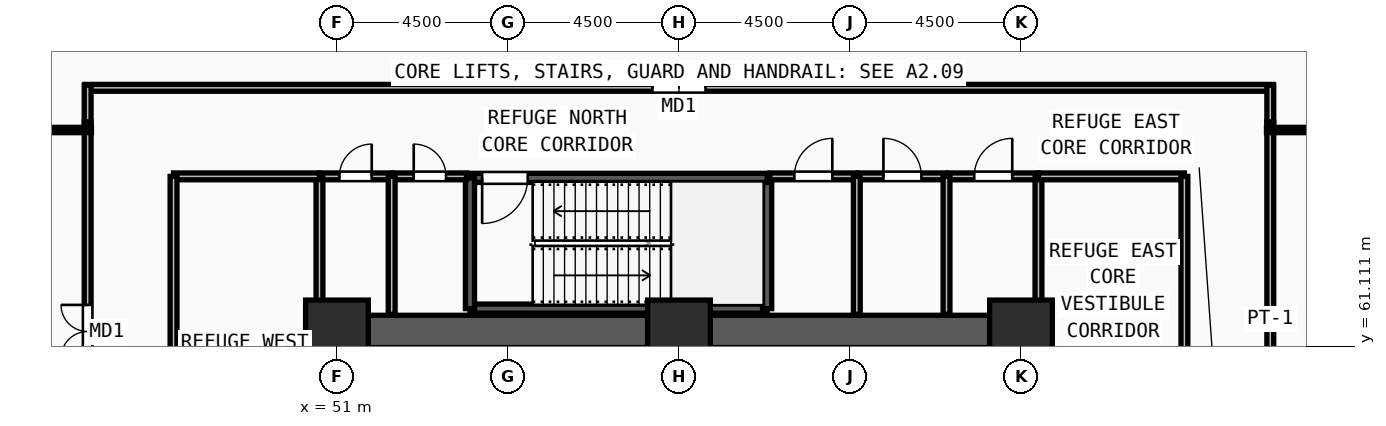
"""IFC4 building model, lengths in metres.
Left out: names, types, materials, properties, quantities, classifications, styles, units other than length and angle.
Written with IfcOpenShell. Run it as: python <this file> out.ifc"""

import sys

from ifc_helpers import new_model, si_unit, direction, frame, frame_2d, origin, origin_2d, place, context, subcontext, project, spatial, rectangle, extrude, source, transform, mapped, element, fill, save


model = new_model("IFC4")
c1 = context("Model", 3, precision=1e-05, world=origin(), true_north=direction((0.0, 1.0)))
c2 = subcontext(c1, "Body", "Model", "MODEL_VIEW")
j1 = project(units=[si_unit("LENGTHUNIT", "METRE"), si_unit("PLANEANGLEUNIT", "RADIAN")], contexts=[c1])
p1 = place(None, origin())
s1 = spatial("IfcSite", under=j1, at=p1, CompositionType="ELEMENT")
p2 = place(p1, origin())
s2 = spatial("IfcBuilding", under=s1, at=p2, CompositionType="ELEMENT")
p3 = place(p2, frame((0.0, 0.0, 47.25)))
s3 = spatial("IfcBuildingStorey", under=s2, at=p3, CompositionType="ELEMENT", Elevation=47.25)
m1 = source(origin(), c2, "Body", "SweptSolid", [
    extrude(rectangle(XDim=1.65, YDim=1.65, at=origin_2d()), origin(), (0.0, 0.0, 1.0), 4.5),
])
for number, where, z_axis, x_axis in (
    (1, (69.0, 61.5, 0.0), (0.0, 0.0, 1.0), (1.0, 0.0, 0.0)),
    (2, (60.0, 61.5, 0.0), (0.0, 0.0, 1.0), (1.0, 0.0, 0.0)),
    (3, (51.0, 61.5, 0.0), (0.0, 0.0, 1.0), (1.0, 0.0, 0.0)),
):
    element("IfcColumn", number, at=place(p3, frame(where, z_axis=z_axis, x_axis=x_axis)), inside=s3, PredefinedType="COLUMN", context=c2, shape_type="MappedRepresentation", body=[
        mapped(m1, transform((0.0, 0.0, 0.0), x_axis=(1.0, 0.0, 0.0), y_axis=(0.0, 1.0, 0.0), z_axis=(0.0, 0.0, 1.0), scale=1.0)),
    ])
for number, where, z_axis, x_axis in (
    (4, (51.825, 61.5, 0.0), (0.0, 0.0, 1.0), (1.0, 0.0, 0.0)),
    (5, (60.825, 61.5, 0.0), (0.0, 0.0, 1.0), (1.0, 0.0, 0.0)),
):
    element("IfcWall", number, at=place(p3, frame(where, z_axis=z_axis, x_axis=x_axis)), inside=s3, PredefinedType="SHEAR", context=c2, shape_type="SweptSolid", body=[
        extrude(rectangle(XDim=7.35, YDim=0.85, at=frame_2d((3.675, 0.0))), origin(), (0.0, 0.0, 1.0), 4.32),
    ])
p4 = place(p3, frame((54.5, 62.1, 0.0), z_axis=(0.0, 0.0, 1.0), x_axis=(1.0, 0.0, 0.0)))
e6 = element("IfcWall", 6, at=p4, inside=s3, PredefinedType="SOLIDWALL", context=c2, shape_type="SweptSolid", body=[
    extrude(rectangle(XDim=7.82, YDim=0.24, at=frame_2d((3.91, 0.0))), origin(), (0.0, 0.0, 1.0), 4.32),
])
p5 = place(p3, frame((62.32, 62.1, 0.0), z_axis=(0.0, 0.0, 1.0), x_axis=(0.0, 1.0, 0.0)))
e7 = element("IfcWall", 7, at=p5, inside=s3, PredefinedType="SOLIDWALL", context=c2, shape_type="SweptSolid", body=[
    extrude(rectangle(XDim=3.44, YDim=0.24, at=frame_2d((1.72, 0.0))), origin(), (0.0, 0.0, 1.0), 4.32),
])
p6 = place(p3, frame((62.32, 65.54, 0.0), z_axis=(0.0, 0.0, 1.0), x_axis=(-1.0, 0.0, 0.0)))
e8 = element("IfcWall", 8, at=p6, inside=s3, PredefinedType="SOLIDWALL", context=c2, shape_type="SweptSolid", body=[
    extrude(rectangle(XDim=7.82, YDim=0.24, at=frame_2d((3.91, 0.0))), origin(), (0.0, 0.0, 1.0), 4.32),
])
m2 = source(origin(), c2, "Body", "SweptSolid", [
    extrude(rectangle(XDim=1.2, YDim=2.2, at=frame_2d((0.6, 1.1))), frame((0.0, 0.13, 0.0), z_axis=(0.0, -1.0, 0.0), x_axis=(1.0, 0.0, 0.0)), (0.0, 0.0, 1.0), 0.26),
])
p7 = place(p6, frame((6.3, 0.0, 0.0)))
e9 = element("IfcOpeningElement", 9, at=p7, cuts=e8, PredefinedType="OPENING", context=c2, shape_type="MappedRepresentation", body=[
    mapped(m2, transform((0.0, 0.0, 0.0), x_axis=(1.0, 0.0, 0.0), y_axis=(0.0, 1.0, 0.0), z_axis=(0.0, 0.0, 1.0), scale=1.0)),
])
p8 = place(p3, frame((54.5, 65.54, 0.0), z_axis=(0.0, 0.0, 1.0), x_axis=(0.0, -1.0, 0.0)))
e10 = element("IfcWall", 10, at=p8, inside=s3, PredefinedType="SOLIDWALL", context=c2, shape_type="SweptSolid", body=[
    extrude(rectangle(XDim=3.44, YDim=0.24, at=frame_2d((1.72, 0.0))), origin(), (0.0, 0.0, 1.0), 4.32),
])
p9 = place(p3, frame((50.54, 65.58, 0.0), z_axis=(0.0, 0.0, 1.0), x_axis=(1.0, 0.0, 0.0)))
e11 = element("IfcWall", 11, at=p9, inside=s3, PredefinedType="PARTITIONING", context=c2, shape_type="SweptSolid", body=[
    extrude(rectangle(XDim=1.9, YDim=0.18, at=frame_2d((0.95, 0.0))), origin(), (0.0, 0.0, 1.0), 4.32),
])
m3 = source(origin(), c2, "Body", "SweptSolid", [
    extrude(rectangle(XDim=0.85, YDim=2.1, at=frame_2d((0.425, 1.05))), frame((0.0, 0.1, 0.0), z_axis=(0.0, -1.0, 0.0), x_axis=(1.0, 0.0, 0.0)), (0.0, 0.0, 1.0), 0.2),
])
p10 = place(p9, frame((0.525, 0.0, 0.0)))
e12 = element("IfcOpeningElement", 12, at=p10, cuts=e11, PredefinedType="OPENING", context=c2, shape_type="MappedRepresentation", body=[
    mapped(m3, transform((0.0, 0.0, 0.0), x_axis=(1.0, 0.0, 0.0), y_axis=(0.0, 1.0, 0.0), z_axis=(0.0, 0.0, 1.0), scale=1.0)),
])
p11 = place(p3, frame((52.48, 65.58, 0.0), z_axis=(0.0, 0.0, 1.0), x_axis=(1.0, 0.0, 0.0)))
e13 = element("IfcWall", 13, at=p11, inside=s3, PredefinedType="PARTITIONING", context=c2, shape_type="SweptSolid", body=[
    extrude(rectangle(XDim=1.93, YDim=0.18, at=frame_2d((0.965, 0.0))), origin(), (0.0, 0.0, 1.0), 4.32),
])
p12 = place(p11, frame((0.54, 0.0, 0.0)))
e14 = element("IfcOpeningElement", 14, at=p12, cuts=e13, PredefinedType="OPENING", context=c2, shape_type="MappedRepresentation", body=[
    mapped(m3, transform((0.0, 0.0, 0.0), x_axis=(1.0, 0.0, 0.0), y_axis=(0.0, 1.0, 0.0), z_axis=(0.0, 0.0, 1.0), scale=1.0)),
])
p13 = place(p3, frame((62.39, 65.58, 0.0), z_axis=(0.0, 0.0, 1.0), x_axis=(1.0, 0.0, 0.0)))
e15 = element("IfcWall", 15, at=p13, inside=s3, PredefinedType="PARTITIONING", context=c2, shape_type="SweptSolid", body=[
    extrude(rectangle(XDim=2.29, YDim=0.18, at=frame_2d((1.145, 0.0))), origin(), (0.0, 0.0, 1.0), 4.32),
])
m4 = source(origin(), c2, "Body", "SweptSolid", [
    extrude(rectangle(XDim=1.0, YDim=2.2, at=frame_2d((0.5, 1.1))), frame((0.0, 0.1, 0.0), z_axis=(0.0, -1.0, 0.0), x_axis=(1.0, 0.0, 0.0)), (0.0, 0.0, 1.0), 0.2),
])
p14 = place(p13, frame((0.645, 0.0, 0.0)))
e16 = element("IfcOpeningElement", 16, at=p14, cuts=e15, PredefinedType="OPENING", context=c2, shape_type="MappedRepresentation", body=[
    mapped(m4, transform((0.0, 0.0, 0.0), x_axis=(1.0, 0.0, 0.0), y_axis=(0.0, 1.0, 0.0), z_axis=(0.0, 0.0, 1.0), scale=1.0)),
])
p15 = place(p3, frame((64.72, 65.58, 0.0), z_axis=(0.0, 0.0, 1.0), x_axis=(1.0, 0.0, 0.0)))
e17 = element("IfcWall", 17, at=p15, inside=s3, PredefinedType="PARTITIONING", context=c2, shape_type="SweptSolid", body=[
    extrude(rectangle(XDim=2.32, YDim=0.18, at=frame_2d((1.16, 0.0))), origin(), (0.0, 0.0, 1.0), 4.32),
])
p16 = place(p15, frame((0.66, 0.0, 0.0)))
e18 = element("IfcOpeningElement", 18, at=p16, cuts=e17, PredefinedType="OPENING", context=c2, shape_type="MappedRepresentation", body=[
    mapped(m4, transform((0.0, 0.0, 0.0), x_axis=(1.0, 0.0, 0.0), y_axis=(0.0, 1.0, 0.0), z_axis=(0.0, 0.0, 1.0), scale=1.0)),
])
p17 = place(p3, frame((67.08, 65.58, 0.0), z_axis=(0.0, 0.0, 1.0), x_axis=(1.0, 0.0, 0.0)))
e19 = element("IfcWall", 19, at=p17, inside=s3, PredefinedType="PARTITIONING", context=c2, shape_type="SweptSolid", body=[
    extrude(rectangle(XDim=2.38, YDim=0.18, at=frame_2d((1.19, 0.0))), origin(), (0.0, 0.0, 1.0), 4.32),
])
p18 = place(p17, frame((0.69, 0.0, 0.0)))
e20 = element("IfcOpeningElement", 20, at=p18, cuts=e19, PredefinedType="OPENING", context=c2, shape_type="MappedRepresentation", body=[
    mapped(m4, transform((0.0, 0.0, 0.0), x_axis=(1.0, 0.0, 0.0), y_axis=(0.0, 1.0, 0.0), z_axis=(0.0, 0.0, 1.0), scale=1.0)),
])
p19 = place(p3, frame((75.56, 67.015, 0.0), z_axis=(0.0, 0.0, 1.0), x_axis=(0.0, -1.0, 0.0)))
e21 = element("IfcWall", 21, at=p19, inside=s3, PredefinedType="PARTITIONING", context=c2, shape_type="SweptSolid", body=[
    extrude(rectangle(XDim=22.43, YDim=0.18, at=frame_2d((11.215, 0.0))), origin(), (0.0, 0.0, 1.0), 4.32),
])
m5 = source(origin(), c2, "Body", "SweptSolid", [
    extrude(rectangle(XDim=1.3, YDim=2.2, at=frame_2d((0.65, 1.1))), frame((0.0, 0.1, 0.0), z_axis=(0.0, -1.0, 0.0), x_axis=(1.0, 0.0, 0.0)), (0.0, 0.0, 1.0), 0.2),
])
p20 = place(p19, frame((10.565, 0.0, 0.0)))
e22 = element("IfcOpeningElement", 22, at=p20, cuts=e21, PredefinedType="OPENING", context=c2, shape_type="MappedRepresentation", body=[
    mapped(m5, transform((0.0, 0.0, 0.0), x_axis=(1.0, 0.0, 0.0), y_axis=(0.0, 1.0, 0.0), z_axis=(0.0, 0.0, 1.0), scale=1.0)),
])
p21 = place(p3, frame((44.37, 67.91, 0.0), z_axis=(0.0, 0.0, 1.0), x_axis=(1.0, 0.0, 0.0)))
e23 = element("IfcWall", 23, at=p21, inside=s3, PredefinedType="PARTITIONING", context=c2, shape_type="SweptSolid", body=[
    extrude(rectangle(XDim=31.26, YDim=0.18, at=frame_2d((15.63, 0.0))), origin(), (0.0, 0.0, 1.0), 4.32),
])
m6 = source(origin(), c2, "Body", "SweptSolid", [
    extrude(rectangle(XDim=1.4, YDim=2.25, at=frame_2d((0.7, 1.125))), frame((0.0, 0.1, 0.0), z_axis=(0.0, -1.0, 0.0), x_axis=(1.0, 0.0, 0.0)), (0.0, 0.0, 1.0), 0.2),
])
p22 = place(p21, frame((14.93, 0.0, 0.0)))
e24 = element("IfcOpeningElement", 24, at=p22, cuts=e23, PredefinedType="OPENING", context=c2, shape_type="MappedRepresentation", body=[
    mapped(m6, transform((0.0, 0.0, 0.0), x_axis=(1.0, 0.0, 0.0), y_axis=(0.0, 1.0, 0.0), z_axis=(0.0, 0.0, 1.0), scale=1.0)),
])
p23 = place(p3, frame((44.44, 55.98, 0.0), z_axis=(0.0, 0.0, 1.0), x_axis=(0.0, 1.0, 0.0)))
e25 = element("IfcWall", 25, at=p23, inside=s3, PredefinedType="PARTITIONING", context=c2, shape_type="SweptSolid", body=[
    extrude(rectangle(XDim=11.035, YDim=0.18, at=frame_2d((5.518, 0.0))), origin(), (0.0, 0.0, 1.0), 4.32),
])
p24 = place(p23, frame((4.818, 0.0, 0.0)))
e26 = element("IfcOpeningElement", 26, at=p24, cuts=e25, PredefinedType="OPENING", context=c2, shape_type="MappedRepresentation", body=[
    mapped(m6, transform((0.0, 0.0, 0.0), x_axis=(1.0, 0.0, 0.0), y_axis=(0.0, 1.0, 0.0), z_axis=(0.0, 0.0, 1.0), scale=1.0)),
])
for number, where, z_axis, x_axis in (
    (27, (50.54, 61.95, 0.0), (0.0, 0.0, 1.0), (0.0, 1.0, 0.0)),
    (28, (52.44, 61.95, 0.0), (0.0, 0.0, 1.0), (0.0, 1.0, 0.0)),
    (29, (64.68, 61.95, 0.0), (0.0, 0.0, 1.0), (0.0, 1.0, 0.0)),
    (30, (67.04, 61.95, 0.0), (0.0, 0.0, 1.0), (0.0, 1.0, 0.0)),
    (31, (69.46, 61.95, 0.0), (0.0, 0.0, 1.0), (0.0, 1.0, 0.0)),
):
    element("IfcWall", number, at=place(p3, frame(where, z_axis=z_axis, x_axis=x_axis)), inside=s3, PredefinedType="PARTITIONING", context=c2, shape_type="SweptSolid", body=[
        extrude(rectangle(XDim=3.63, YDim=0.18, at=frame_2d((1.815, 0.0))), origin(), (0.0, 0.0, 1.0), 4.32),
    ])
for number, where, z_axis, x_axis in (
    (32, (46.7, 65.58, 0.0), (0.0, 0.0, 1.0), (1.0, 0.0, 0.0)),
    (33, (69.46, 65.58, 0.0), (0.0, 0.0, 1.0), (1.0, 0.0, 0.0)),
):
    element("IfcWall", number, at=place(p3, frame(where, z_axis=z_axis, x_axis=x_axis)), inside=s3, PredefinedType="PARTITIONING", context=c2, shape_type="SweptSolid", body=[
        extrude(rectangle(XDim=3.84, YDim=0.18, at=frame_2d((1.92, 0.0))), origin(), (0.0, 0.0, 1.0), 4.32),
    ])
for number, where, z_axis, x_axis in (
    (34, (46.7, 60.06, 0.0), (0.0, 0.0, 1.0), (0.0, 1.0, 0.0)),
    (35, (73.3, 60.06, 0.0), (0.0, 0.0, 1.0), (0.0, 1.0, 0.0)),
):
    element("IfcWall", number, at=place(p3, frame(where, z_axis=z_axis, x_axis=x_axis)), inside=s3, PredefinedType="PARTITIONING", context=c2, shape_type="SweptSolid", body=[
        extrude(rectangle(XDim=5.52, YDim=0.18, at=frame_2d((2.76, 0.0))), origin(), (0.0, 0.0, 1.0), 4.32),
    ])
for number, where, z_axis, x_axis in (
    (36, (44.44, 67.015, 0.0), (0.0, 0.0, 1.0), (0.0, 1.0, 0.0)),
    (37, (75.56, 67.98, 0.0), (0.0, 0.0, 1.0), (0.0, -1.0, 0.0)),
):
    element("IfcWall", number, at=place(p3, frame(where, z_axis=z_axis, x_axis=x_axis)), inside=s3, PredefinedType="PARTITIONING", context=c2, shape_type="SweptSolid", body=[
        extrude(rectangle(XDim=0.965, YDim=0.18, at=frame_2d((0.482, 0.0))), origin(), (0.0, 0.0, 1.0), 4.32),
    ])
p25 = place(p3, frame((44.54, 66.8, 0.0), z_axis=(0.0, 0.0, 1.0), x_axis=(-1.0, 0.0, 0.0)))
e38 = element("IfcWall", 38, at=p25, inside=s3, PredefinedType="PARTITIONING", context=c2, shape_type="SweptSolid", body=[
    extrude(rectangle(XDim=22.983, YDim=0.14, at=frame_2d((11.492, 0.0))), origin(), (0.0, 0.0, 1.0), 3.405),
])
p26 = place(p3, frame((75.46, 66.8, 0.0), z_axis=(0.0, 0.0, 1.0), x_axis=(1.0, 0.0, 0.0)))
e39 = element("IfcWall", 39, at=p26, inside=s3, PredefinedType="PARTITIONING", context=c2, shape_type="SweptSolid", body=[
    extrude(rectangle(XDim=23.018, YDim=0.14, at=frame_2d((11.509, 0.0))), origin(), (0.0, 0.0, 1.0), 3.405),
])
m7 = source(origin(), c2, "Body", "SweptSolid", [
    extrude(rectangle(XDim=1.2, YDim=2.2, at=frame_2d((0.6, 1.1))), frame((0.0, 0.025, 0.0), z_axis=(0.0, -1.0, 0.0), x_axis=(1.0, 0.0, 0.0)), (0.0, 0.0, 1.0), 0.05),
])
p27 = place(p7, origin())
e40 = element("IfcDoor", 40, at=p27, inside=s3, OperationType="SINGLE_SWING_RIGHT", PredefinedType="DOOR", context=c2, shape_type="MappedRepresentation", body=[
    mapped(m7, transform((0.0, 0.0, 0.0), x_axis=(1.0, 0.0, 0.0), y_axis=(0.0, 1.0, 0.0), z_axis=(0.0, 0.0, 1.0), scale=1.0)),
])
fill(e9, e40)
m8 = source(origin(), c2, "Body", "SweptSolid", [
    extrude(rectangle(XDim=0.85, YDim=2.1, at=frame_2d((0.425, 1.05))), frame((0.0, 0.025, 0.0), z_axis=(0.0, -1.0, 0.0), x_axis=(1.0, 0.0, 0.0)), (0.0, 0.0, 1.0), 0.05),
])
p28 = place(p10, origin())
e41 = element("IfcDoor", 41, at=p28, inside=s3, OperationType="SINGLE_SWING_RIGHT", PredefinedType="DOOR", context=c2, shape_type="MappedRepresentation", body=[
    mapped(m8, transform((0.0, 0.0, 0.0), x_axis=(1.0, 0.0, 0.0), y_axis=(0.0, 1.0, 0.0), z_axis=(0.0, 0.0, 1.0), scale=1.0)),
])
fill(e12, e41)
p29 = place(p12, origin())
e42 = element("IfcDoor", 42, at=p29, inside=s3, OperationType="SINGLE_SWING_LEFT", PredefinedType="DOOR", context=c2, shape_type="MappedRepresentation", body=[
    mapped(m8, transform((0.0, 0.0, 0.0), x_axis=(1.0, 0.0, 0.0), y_axis=(0.0, 1.0, 0.0), z_axis=(0.0, 0.0, 1.0), scale=1.0)),
])
fill(e14, e42)
m9 = source(origin(), c2, "Body", "SweptSolid", [
    extrude(rectangle(XDim=1.0, YDim=2.2, at=frame_2d((0.5, 1.1))), frame((0.0, 0.025, 0.0), z_axis=(0.0, -1.0, 0.0), x_axis=(1.0, 0.0, 0.0)), (0.0, 0.0, 1.0), 0.05),
])
p30 = place(p14, origin())
e43 = element("IfcDoor", 43, at=p30, inside=s3, OperationType="SINGLE_SWING_RIGHT", PredefinedType="DOOR", context=c2, shape_type="MappedRepresentation", body=[
    mapped(m9, transform((0.0, 0.0, 0.0), x_axis=(1.0, 0.0, 0.0), y_axis=(0.0, 1.0, 0.0), z_axis=(0.0, 0.0, 1.0), scale=1.0)),
])
fill(e16, e43)
p31 = place(p16, origin())
e44 = element("IfcDoor", 44, at=p31, inside=s3, OperationType="SINGLE_SWING_LEFT", PredefinedType="DOOR", context=c2, shape_type="MappedRepresentation", body=[
    mapped(m9, transform((0.0, 0.0, 0.0), x_axis=(1.0, 0.0, 0.0), y_axis=(0.0, 1.0, 0.0), z_axis=(0.0, 0.0, 1.0), scale=1.0)),
])
fill(e18, e44)
p32 = place(p18, origin())
e45 = element("IfcDoor", 45, at=p32, inside=s3, OperationType="SINGLE_SWING_RIGHT", PredefinedType="DOOR", context=c2, shape_type="MappedRepresentation", body=[
    mapped(m9, transform((0.0, 0.0, 0.0), x_axis=(1.0, 0.0, 0.0), y_axis=(0.0, 1.0, 0.0), z_axis=(0.0, 0.0, 1.0), scale=1.0)),
])
fill(e20, e45)
m10 = source(origin(), c2, "Body", "SweptSolid", [
    extrude(rectangle(XDim=1.4, YDim=2.25, at=frame_2d((0.7, 1.125))), frame((0.0, 0.025, 0.0), z_axis=(0.0, -1.0, 0.0), x_axis=(1.0, 0.0, 0.0)), (0.0, 0.0, 1.0), 0.05),
])
p33 = place(p22, origin())
e46 = element("IfcDoor", 46, at=p33, inside=s3, OperationType="DOUBLE_DOOR_SINGLE_SWING", PredefinedType="DOOR", context=c2, shape_type="MappedRepresentation", body=[
    mapped(m10, transform((0.0, 0.0, 0.0), x_axis=(1.0, 0.0, 0.0), y_axis=(0.0, 1.0, 0.0), z_axis=(0.0, 0.0, 1.0), scale=1.0)),
])
fill(e24, e46)
p34 = place(p24, origin())
e47 = element("IfcDoor", 47, at=p34, inside=s3, OperationType="DOUBLE_DOOR_SINGLE_SWING", PredefinedType="DOOR", context=c2, shape_type="MappedRepresentation", body=[
    mapped(m10, transform((0.0, 0.0, 0.0), x_axis=(1.0, 0.0, 0.0), y_axis=(0.0, 1.0, 0.0), z_axis=(0.0, 0.0, 1.0), scale=1.0)),
])
fill(e26, e47)
save(model, sys.argv[1])
